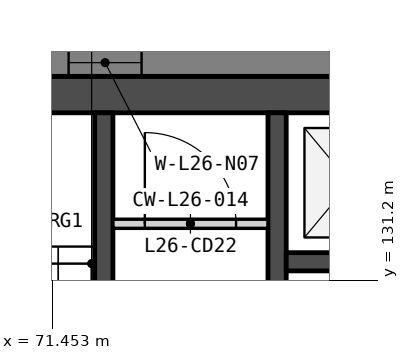
"""IFC4 building model, lengths in metres.
Left out: names, types, materials, properties, quantities, classifications, styles, units other than length and angle.
Written with IfcOpenShell. Run it as: python <this file> out.ifc"""

import sys

from ifc_helpers import new_model, si_unit, direction, frame, frame_2d, origin, place, context, subcontext, project, spatial, polyline, rectangle, outline, extrude, element, fill, save


model = new_model("IFC4")
c1 = context("Model", 3, precision=1e-05, world=origin(), true_north=direction((0.0, 1.0)))
c2 = subcontext(c1, "Body", "Model", "MODEL_VIEW")
j1 = project(units=[si_unit("LENGTHUNIT", "METRE"), si_unit("PLANEANGLEUNIT", "RADIAN")], contexts=[c1])
p1 = place(None, origin())
s1 = spatial("IfcSite", under=j1, at=p1, CompositionType="ELEMENT")
p2 = place(p1, origin())
s2 = spatial("IfcBuilding", under=s1, at=p2, CompositionType="ELEMENT")
p3 = place(p2, frame((0.0, 0.0, 106.3)))
s3 = spatial("IfcBuildingStorey", under=s2, at=p3, CompositionType="ELEMENT", Elevation=106.3)
p4 = place(p3, frame((66.0, 134.25, 0.0), z_axis=(0.0, 0.0, 1.0), x_axis=(1.0, 0.0, 0.0)))
e1 = element("IfcWall", 1, at=p4, inside=s3, PredefinedType="SOLIDWALL", context=c2, shape_type="SweptSolid", body=[
    extrude(rectangle(XDim=28.0, YDim=0.6, at=frame_2d((14.0, 0.0))), origin(), (0.0, 0.0, 1.0), 3.35),
])
p5 = place(p3, frame((72.3, 133.95, 0.0), z_axis=(0.0, 0.0, 1.0), x_axis=(0.0, -1.0, 0.0)))
e2 = element("IfcWall", 2, at=p5, inside=s3, PredefinedType="SOLIDWALL", context=c2, shape_type="SweptSolid", body=[
    extrude(rectangle(XDim=11.7, YDim=0.3, at=frame_2d((5.85, 0.0))), origin(), (0.0, 0.0, 1.0), 3.35),
])
p6 = place(p5, frame((6.95, 0.0, 0.0)))
e3 = element("IfcOpeningElement", 3, at=p6, cuts=e2, PredefinedType="OPENING", context=c2, shape_type="SweptSolid", body=[
    extrude(rectangle(XDim=1.1, YDim=2.1, at=frame_2d((0.55, 1.05))), frame((0.0, 0.16, 0.0), z_axis=(0.0, -1.0, 0.0), x_axis=(1.0, 0.0, 0.0)), (0.0, 0.0, 1.0), 0.32),
])
p7 = place(p5, frame((9.35, 0.0, 0.0)))
e4 = element("IfcOpeningElement", 4, at=p7, cuts=e2, PredefinedType="OPENING", context=c2, shape_type="SweptSolid", body=[
    extrude(rectangle(XDim=0.9, YDim=2.1, at=frame_2d((0.45, 1.05))), frame((0.0, 0.16, 0.0), z_axis=(0.0, -1.0, 0.0), x_axis=(1.0, 0.0, 0.0)), (0.0, 0.0, 1.0), 0.32),
])
p8 = place(p5, frame((5.1, 0.0, 0.0)))
e5 = element("IfcOpeningElement", 5, at=p8, cuts=e2, PredefinedType="OPENING", context=c2, shape_type="SweptSolid", body=[
    extrude(rectangle(XDim=1.0, YDim=2.1, at=frame_2d((0.5, 1.05))), frame((0.0, 0.16, 0.0), z_axis=(0.0, -1.0, 0.0), x_axis=(1.0, 0.0, 0.0)), (0.0, 0.0, 1.0), 0.32),
])
p9 = place(p3, frame((72.45, 132.125, 0.0), z_axis=(0.0, 0.0, 1.0), x_axis=(1.0, 0.0, 0.0)))
e6 = element("IfcWall", 6, at=p9, inside=s3, PredefinedType="PARTITIONING", context=c2, shape_type="SweptSolid", body=[
    extrude(rectangle(XDim=2.55, YDim=0.15, at=frame_2d((1.275, 0.0))), origin(), (0.0, 0.0, 1.0), 3.35),
])
p10 = place(p9, frame((0.525, 0.0, 0.0)))
e7 = element("IfcOpeningElement", 7, at=p10, cuts=e6, PredefinedType="OPENING", context=c2, shape_type="SweptSolid", body=[
    extrude(rectangle(XDim=1.5, YDim=2.1, at=frame_2d((0.75, 1.05))), frame((0.0, 0.085, 0.0), z_axis=(0.0, -1.0, 0.0), x_axis=(1.0, 0.0, 0.0)), (0.0, 0.0, 1.0), 0.17),
])
p11 = place(p3, frame((75.15, 133.95, 0.0), z_axis=(0.0, 0.0, 1.0), x_axis=(0.0, -1.0, 0.0)))
e8 = element("IfcWall", 8, at=p11, inside=s3, PredefinedType="SOLIDWALL", context=c2, shape_type="SweptSolid", body=[
    extrude(rectangle(XDim=11.7, YDim=0.3, at=frame_2d((5.85, 0.0))), origin(), (0.0, 0.0, 1.0), 3.35),
])
p12 = place(p3, frame((75.3, 131.5, 0.0), z_axis=(0.0, 0.0, 1.0), x_axis=(1.0, 0.0, 0.0)))
e9 = element("IfcWall", 9, at=p12, inside=s3, PredefinedType="SOLIDWALL", context=c2, shape_type="SweptSolid", body=[
    extrude(rectangle(XDim=2.1, YDim=0.3, at=frame_2d((1.05, 0.0))), origin(), (0.0, 0.0, 1.0), 3.35),
])
p13 = place(p3, frame((101.322, 134.775, -0.15), z_axis=(0.0, 0.0, 1.0), x_axis=(-1.0, 0.0, 0.0)))
e10 = element("IfcWall", 10, at=p13, inside=s3, PredefinedType="SOLIDWALL", context=c2, shape_type="SweptSolid", body=[
    extrude(outline(polyline([(42.643, 0.0), (42.643, 3.5), (0.0, 3.5), (0.0, 0.0), (42.643, 0.0)])), frame((0.0, 0.225, 0.0), z_axis=(0.0, -1.0, 0.0), x_axis=(1.0, 0.0, 0.0)), (0.0, 0.0, 1.0), 0.45),
])
p14 = place(p13, frame((2.814, 0.0, 1.05)))
e11 = element("IfcOpeningElement", 11, at=p14, cuts=e10, PredefinedType="OPENING", context=c2, shape_type="SweptSolid", body=[
    extrude(rectangle(XDim=1.2, YDim=1.5, at=frame_2d((0.6, 0.75))), frame((0.0, 0.235, 0.0), z_axis=(0.0, -1.0, 0.0), x_axis=(1.0, 0.0, 0.0)), (0.0, 0.0, 1.0), 0.47),
])
p15 = place(p13, frame((4.514, 0.0, 1.05)))
e12 = element("IfcOpeningElement", 12, at=p15, cuts=e10, PredefinedType="OPENING", context=c2, shape_type="SweptSolid", body=[
    extrude(rectangle(XDim=1.2, YDim=1.5, at=frame_2d((0.6, 0.75))), frame((0.0, 0.235, 0.0), z_axis=(0.0, -1.0, 0.0), x_axis=(1.0, 0.0, 0.0)), (0.0, 0.0, 1.0), 0.47),
])
p16 = place(p13, frame((11.343, 0.0, 1.05)))
e13 = element("IfcOpeningElement", 13, at=p16, cuts=e10, PredefinedType="OPENING", context=c2, shape_type="SweptSolid", body=[
    extrude(rectangle(XDim=1.2, YDim=1.5, at=frame_2d((0.6, 0.75))), frame((0.0, 0.235, 0.0), z_axis=(0.0, -1.0, 0.0), x_axis=(1.0, 0.0, 0.0)), (0.0, 0.0, 1.0), 0.47),
])
p17 = place(p13, frame((13.043, 0.0, 1.05)))
e14 = element("IfcOpeningElement", 14, at=p17, cuts=e10, PredefinedType="OPENING", context=c2, shape_type="SweptSolid", body=[
    extrude(rectangle(XDim=1.2, YDim=1.5, at=frame_2d((0.6, 0.75))), frame((0.0, 0.235, 0.0), z_axis=(0.0, -1.0, 0.0), x_axis=(1.0, 0.0, 0.0)), (0.0, 0.0, 1.0), 0.47),
])
p18 = place(p13, frame((19.872, 0.0, 1.05)))
e15 = element("IfcOpeningElement", 15, at=p18, cuts=e10, PredefinedType="OPENING", context=c2, shape_type="SweptSolid", body=[
    extrude(rectangle(XDim=1.2, YDim=1.5, at=frame_2d((0.6, 0.75))), frame((0.0, 0.235, 0.0), z_axis=(0.0, -1.0, 0.0), x_axis=(1.0, 0.0, 0.0)), (0.0, 0.0, 1.0), 0.47),
])
p19 = place(p13, frame((21.572, 0.0, 1.05)))
e16 = element("IfcOpeningElement", 16, at=p19, cuts=e10, PredefinedType="OPENING", context=c2, shape_type="SweptSolid", body=[
    extrude(rectangle(XDim=1.2, YDim=1.5, at=frame_2d((0.6, 0.75))), frame((0.0, 0.235, 0.0), z_axis=(0.0, -1.0, 0.0), x_axis=(1.0, 0.0, 0.0)), (0.0, 0.0, 1.0), 0.47),
])
p20 = place(p13, frame((28.4, 0.0, 1.05)))
e17 = element("IfcOpeningElement", 17, at=p20, cuts=e10, PredefinedType="OPENING", context=c2, shape_type="SweptSolid", body=[
    extrude(rectangle(XDim=1.2, YDim=1.5, at=frame_2d((0.6, 0.75))), frame((0.0, 0.235, 0.0), z_axis=(0.0, -1.0, 0.0), x_axis=(1.0, 0.0, 0.0)), (0.0, 0.0, 1.0), 0.47),
])
p21 = place(p13, frame((30.1, 0.0, 1.05)))
e18 = element("IfcOpeningElement", 18, at=p21, cuts=e10, PredefinedType="OPENING", context=c2, shape_type="SweptSolid", body=[
    extrude(rectangle(XDim=1.2, YDim=1.5, at=frame_2d((0.6, 0.75))), frame((0.0, 0.235, 0.0), z_axis=(0.0, -1.0, 0.0), x_axis=(1.0, 0.0, 0.0)), (0.0, 0.0, 1.0), 0.47),
])
p22 = place(p13, frame((36.929, 0.0, 1.05)))
e19 = element("IfcOpeningElement", 19, at=p22, cuts=e10, PredefinedType="OPENING", context=c2, shape_type="SweptSolid", body=[
    extrude(rectangle(XDim=1.2, YDim=1.5, at=frame_2d((0.6, 0.75))), frame((0.0, 0.235, 0.0), z_axis=(0.0, -1.0, 0.0), x_axis=(1.0, 0.0, 0.0)), (0.0, 0.0, 1.0), 0.47),
])
p23 = place(p13, frame((38.629, 0.0, 1.05)))
e20 = element("IfcOpeningElement", 20, at=p23, cuts=e10, PredefinedType="OPENING", context=c2, shape_type="SweptSolid", body=[
    extrude(rectangle(XDim=1.2, YDim=1.5, at=frame_2d((0.6, 0.75))), frame((0.0, 0.235, 0.0), z_axis=(0.0, -1.0, 0.0), x_axis=(1.0, 0.0, 0.0)), (0.0, 0.0, 1.0), 0.47),
])
p24 = place(p10, origin())
e21 = element("IfcDoor", 21, at=p24, inside=s3, OperationType="DOUBLE_DOOR_DOUBLE_SWING", PredefinedType="DOOR", context=c2, shape_type="SweptSolid", body=[
    extrude(rectangle(XDim=1.5, YDim=2.1, at=frame_2d((0.75, 1.05))), frame((0.0, 0.025, 0.0), z_axis=(0.0, -1.0, 0.0), x_axis=(1.0, 0.0, 0.0)), (0.0, 0.0, 1.0), 0.05),
])
fill(e7, e21)
p25 = place(p20, origin())
e22 = element("IfcWindow", 22, at=p25, inside=s3, PartitioningType="SINGLE_PANEL", PredefinedType="WINDOW", context=c2, shape_type="SweptSolid", body=[
    extrude(rectangle(XDim=1.2, YDim=1.5, at=frame_2d((0.6, 0.75))), frame((0.0, 0.03, 0.0), z_axis=(0.0, -1.0, 0.0), x_axis=(1.0, 0.0, 0.0)), (0.0, 0.0, 1.0), 0.06),
])
fill(e17, e22)
save(model, sys.argv[1])
